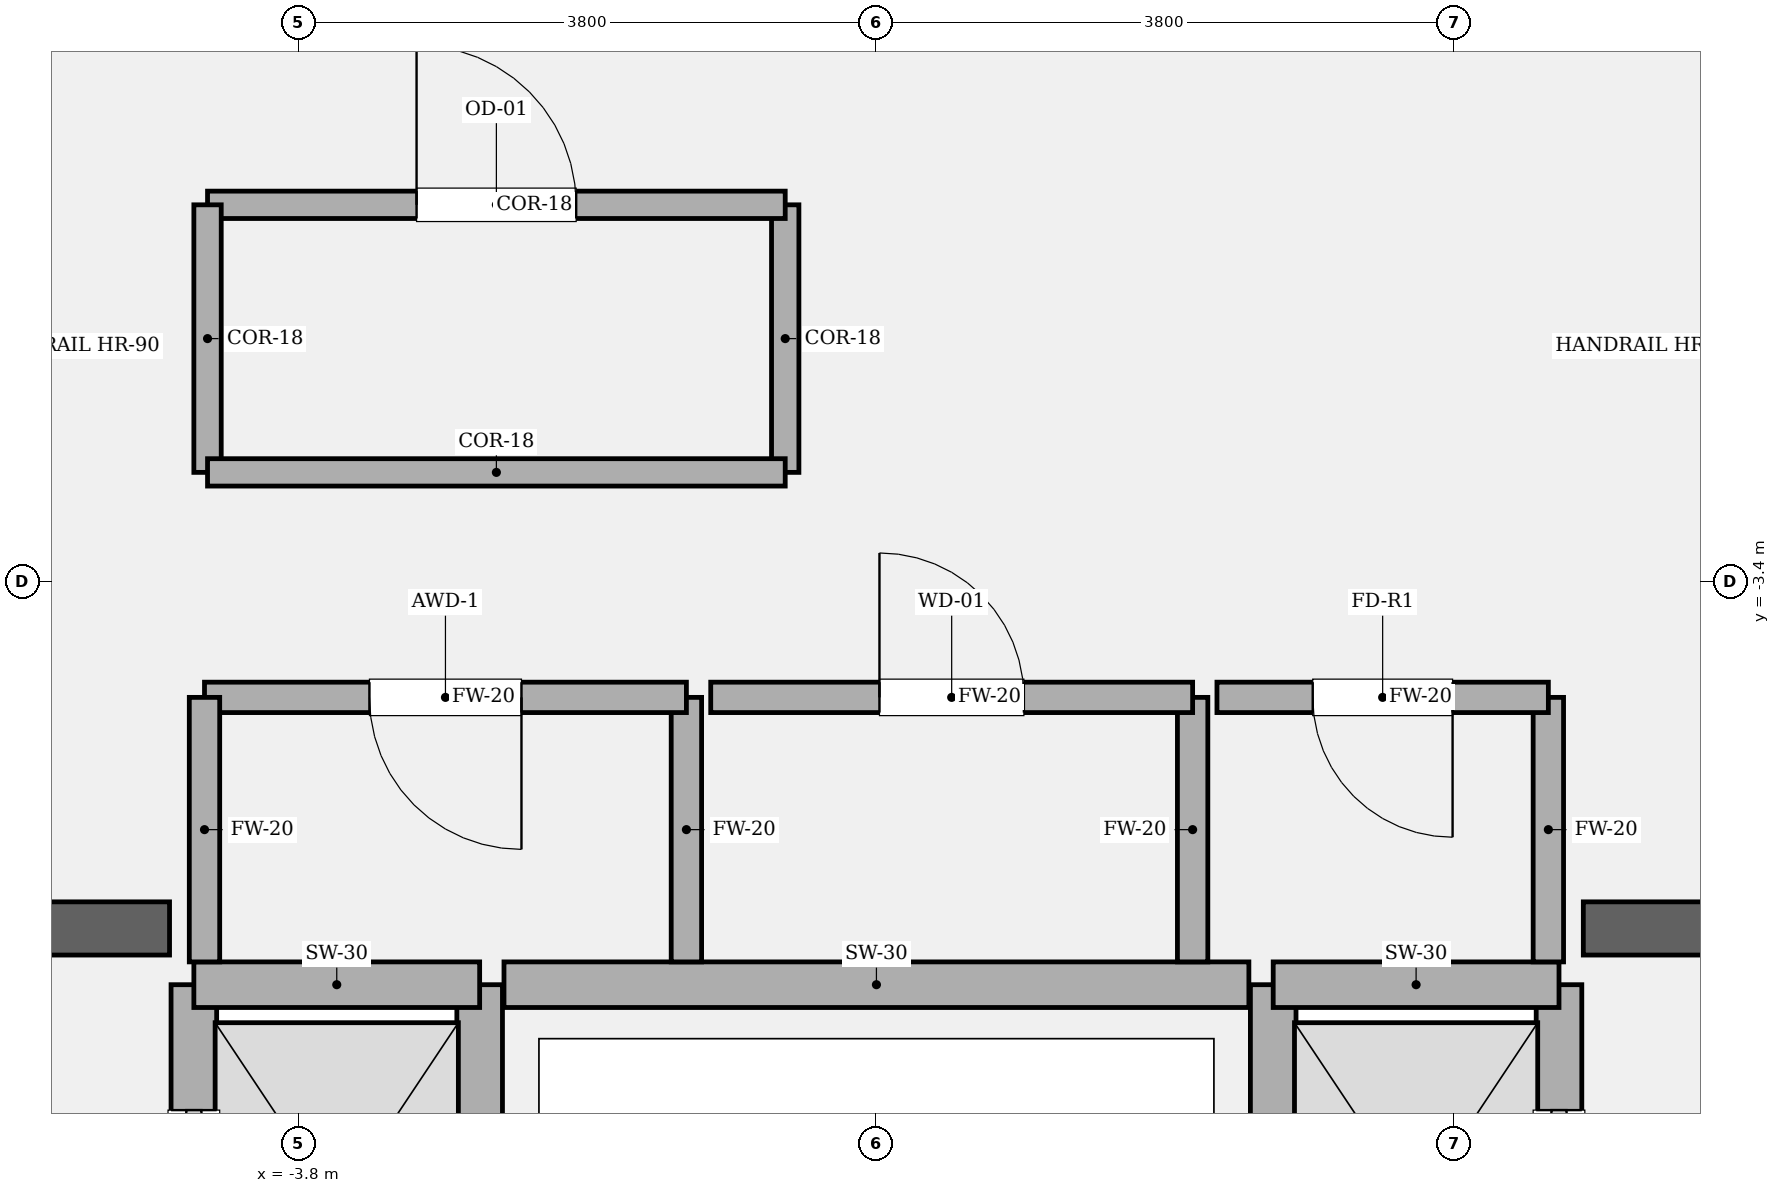
"""IFC4 building model, lengths in metres.
Left out: names, types, materials, properties, quantities, classifications, styles, units other than length and angle.
Written with IfcOpenShell. Run it as: python <this file> out.ifc"""

import sys

from ifc_helpers import new_model, si_unit, direction, frame, frame_2d, origin, place, context, subcontext, project, spatial, rectangle, extrude, element, fill, save


model = new_model("IFC4")
c1 = context("Model", 3, precision=1e-05, world=origin(), true_north=direction((0.0, 1.0)))
c2 = subcontext(c1, "Body", "Model", "MODEL_VIEW")
j1 = project(units=[si_unit("LENGTHUNIT", "METRE"), si_unit("PLANEANGLEUNIT", "RADIAN")], contexts=[c1])
p1 = place(None, origin())
s1 = spatial("IfcSite", under=j1, at=p1, CompositionType="ELEMENT")
p2 = place(p1, origin())
s2 = spatial("IfcBuilding", under=s1, at=p2, CompositionType="ELEMENT")
p3 = place(p2, frame((0.0, 0.0, 200.55)))
s3 = spatial("IfcBuildingStorey", under=s2, at=p3, CompositionType="ELEMENT", Elevation=200.55)
p4 = place(p3, frame((-9.875, -5.68, 0.0), z_axis=(0.0, 0.0, 1.0), x_axis=(1.0, 0.0, 0.0)))
e1 = element("IfcWall", 1, at=p4, inside=s3, PredefinedType="SOLIDWALL", context=c2, shape_type="SweptSolid", body=[
    extrude(rectangle(XDim=5.225, YDim=0.35, at=frame_2d((2.613, 0.0))), origin(), (0.0, 0.0, 1.0), 4.05),
])
p5 = place(p4, frame((1.335, 0.0, 0.0)))
e2 = element("IfcOpeningElement", 2, at=p5, cuts=e1, PredefinedType="OPENING", context=c2, shape_type="SweptSolid", body=[
    extrude(rectangle(XDim=1.18, YDim=2.2, at=frame_2d((0.59, 1.1))), frame((0.0, 0.185, 0.0), z_axis=(0.0, -1.0, 0.0), x_axis=(1.0, 0.0, 0.0)), (0.0, 0.0, 1.0), 0.37),
])
p6 = place(p3, frame((4.65, -5.68, 0.0), z_axis=(0.0, 0.0, 1.0), x_axis=(1.0, 0.0, 0.0)))
e3 = element("IfcWall", 3, at=p6, inside=s3, PredefinedType="SOLIDWALL", context=c2, shape_type="SweptSolid", body=[
    extrude(rectangle(XDim=5.225, YDim=0.35, at=frame_2d((2.613, 0.0))), origin(), (0.0, 0.0, 1.0), 4.05),
])
p7 = place(p6, frame((2.71, 0.0, 0.0)))
e4 = element("IfcOpeningElement", 4, at=p7, cuts=e3, PredefinedType="OPENING", context=c2, shape_type="SweptSolid", body=[
    extrude(rectangle(XDim=1.18, YDim=2.2, at=frame_2d((0.59, 1.1))), frame((0.0, 0.185, 0.0), z_axis=(0.0, -1.0, 0.0), x_axis=(1.0, 0.0, 0.0)), (0.0, 0.0, 1.0), 0.37),
])
p8 = place(p3, frame((-4.49, -8.82, 0.0), z_axis=(0.0, 0.0, 1.0), x_axis=(0.0, 1.0, 0.0)))
e5 = element("IfcWall", 5, at=p8, inside=s3, PredefinedType="SOLIDWALL", context=c2, shape_type="SweptSolid", body=[
    extrude(rectangle(XDim=2.77, YDim=0.3, at=frame_2d((1.385, 0.0))), origin(), (0.0, 0.0, 1.0), 3.77),
])
p9 = place(p8, frame((0.825, 0.0, 0.0)))
e6 = element("IfcOpeningElement", 6, at=p9, cuts=e5, PredefinedType="OPENING", context=c2, shape_type="SweptSolid", body=[
    extrude(rectangle(XDim=1.12, YDim=2.25, at=frame_2d((0.56, 1.125))), frame((0.0, 0.16, 0.0), z_axis=(0.0, -1.0, 0.0), x_axis=(1.0, 0.0, 0.0)), (0.0, 0.0, 1.0), 0.32),
])
p10 = place(p3, frame((-2.61, -8.82, 0.0), z_axis=(0.0, 0.0, 1.0), x_axis=(0.0, 1.0, 0.0)))
e7 = element("IfcWall", 7, at=p10, inside=s3, PredefinedType="SOLIDWALL", context=c2, shape_type="SweptSolid", body=[
    extrude(rectangle(XDim=2.77, YDim=0.3, at=frame_2d((1.385, 0.0))), origin(), (0.0, 0.0, 1.0), 3.77),
])
p11 = place(p3, frame((-4.49, -6.05, 0.0), z_axis=(0.0, 0.0, 1.0), x_axis=(1.0, 0.0, 0.0)))
e8 = element("IfcWall", 8, at=p11, inside=s3, PredefinedType="SOLIDWALL", context=c2, shape_type="SweptSolid", body=[
    extrude(rectangle(XDim=1.88, YDim=0.3, at=frame_2d((0.94, 0.0))), origin(), (0.0, 0.0, 1.0), 3.77),
])
p12 = place(p3, frame((4.49, -8.82, 0.0), z_axis=(0.0, 0.0, 1.0), x_axis=(0.0, 1.0, 0.0)))
e9 = element("IfcWall", 9, at=p12, inside=s3, PredefinedType="SOLIDWALL", context=c2, shape_type="SweptSolid", body=[
    extrude(rectangle(XDim=2.77, YDim=0.3, at=frame_2d((1.385, 0.0))), origin(), (0.0, 0.0, 1.0), 3.77),
])
p13 = place(p12, frame((0.825, 0.0, 0.0)))
e10 = element("IfcOpeningElement", 10, at=p13, cuts=e9, PredefinedType="OPENING", context=c2, shape_type="SweptSolid", body=[
    extrude(rectangle(XDim=1.12, YDim=2.25, at=frame_2d((0.56, 1.125))), frame((0.0, 0.16, 0.0), z_axis=(0.0, -1.0, 0.0), x_axis=(1.0, 0.0, 0.0)), (0.0, 0.0, 1.0), 0.32),
])
p14 = place(p3, frame((2.61, -8.82, 0.0), z_axis=(0.0, 0.0, 1.0), x_axis=(0.0, 1.0, 0.0)))
e11 = element("IfcWall", 11, at=p14, inside=s3, PredefinedType="SOLIDWALL", context=c2, shape_type="SweptSolid", body=[
    extrude(rectangle(XDim=2.77, YDim=0.3, at=frame_2d((1.385, 0.0))), origin(), (0.0, 0.0, 1.0), 3.77),
])
p15 = place(p3, frame((2.61, -6.05, 0.0), z_axis=(0.0, 0.0, 1.0), x_axis=(1.0, 0.0, 0.0)))
e12 = element("IfcWall", 12, at=p15, inside=s3, PredefinedType="SOLIDWALL", context=c2, shape_type="SweptSolid", body=[
    extrude(rectangle(XDim=1.88, YDim=0.3, at=frame_2d((0.94, 0.0))), origin(), (0.0, 0.0, 1.0), 3.77),
])
p16 = place(p3, frame((-2.45, -6.05, 0.0), z_axis=(0.0, 0.0, 1.0), x_axis=(1.0, 0.0, 0.0)))
e13 = element("IfcWall", 13, at=p16, inside=s3, PredefinedType="SOLIDWALL", context=c2, shape_type="SweptSolid", body=[
    extrude(rectangle(XDim=4.9, YDim=0.3, at=frame_2d((2.45, 0.0))), origin(), (0.0, 0.0, 1.0), 3.77),
])
p17 = place(p3, frame((-1.25, -5.9, 0.0), z_axis=(0.0, 0.0, 1.0), x_axis=(0.0, 1.0, 0.0)))
e14 = element("IfcWall", 14, at=p17, inside=s3, PredefinedType="SOLIDWALL", context=c2, shape_type="SweptSolid", body=[
    extrude(rectangle(XDim=1.74, YDim=0.2, at=frame_2d((0.87, 0.0))), origin(), (0.0, 0.0, 1.0), 3.77),
])
p18 = place(p3, frame((-1.25, -4.16, 0.0), z_axis=(0.0, 0.0, 1.0), x_axis=(-1.0, 0.0, 0.0)))
e15 = element("IfcWall", 15, at=p18, inside=s3, PredefinedType="SOLIDWALL", context=c2, shape_type="SweptSolid", body=[
    extrude(rectangle(XDim=3.17, YDim=0.2, at=frame_2d((1.585, 0.0))), origin(), (0.0, 0.0, 1.0), 3.77),
])
p19 = place(p18, frame((1.085, 0.0, 0.0)))
e16 = element("IfcOpeningElement", 16, at=p19, cuts=e15, PredefinedType="OPENING", context=c2, shape_type="SweptSolid", body=[
    extrude(rectangle(XDim=1.0, YDim=2.15, at=frame_2d((0.5, 1.075))), frame((0.0, 0.11, 0.0), z_axis=(0.0, -1.0, 0.0), x_axis=(1.0, 0.0, 0.0)), (0.0, 0.0, 1.0), 0.22),
])
for number, where, z_axis, x_axis in (
    (17, (-4.42, -4.16, 0.0), (0.0, 0.0, 1.0), (0.0, -1.0, 0.0)),
    (18, (2.08, -5.9, 0.0), (0.0, 0.0, 1.0), (0.0, 1.0, 0.0)),
):
    element("IfcWall", number, at=place(p3, frame(where, z_axis=z_axis, x_axis=x_axis)), inside=s3, PredefinedType="SOLIDWALL", context=c2, shape_type="SweptSolid", body=[
        extrude(rectangle(XDim=1.74, YDim=0.2, at=frame_2d((0.87, 0.0))), origin(), (0.0, 0.0, 1.0), 3.77),
    ])
p20 = place(p3, frame((2.08, -4.16, 0.0), z_axis=(0.0, 0.0, 1.0), x_axis=(-1.0, 0.0, 0.0)))
e19 = element("IfcWall", 19, at=p20, inside=s3, PredefinedType="SOLIDWALL", context=c2, shape_type="SweptSolid", body=[
    extrude(rectangle(XDim=3.17, YDim=0.2, at=frame_2d((1.585, 0.0))), origin(), (0.0, 0.0, 1.0), 3.77),
])
p21 = place(p20, frame((1.11, 0.0, 0.0)))
e20 = element("IfcOpeningElement", 20, at=p21, cuts=e19, PredefinedType="OPENING", context=c2, shape_type="SweptSolid", body=[
    extrude(rectangle(XDim=0.95, YDim=2.15, at=frame_2d((0.475, 1.075))), frame((0.0, 0.11, 0.0), z_axis=(0.0, -1.0, 0.0), x_axis=(1.0, 0.0, 0.0)), (0.0, 0.0, 1.0), 0.22),
])
p22 = place(p3, frame((4.42, -5.9, 0.0), z_axis=(0.0, 0.0, 1.0), x_axis=(0.0, 1.0, 0.0)))
e21 = element("IfcWall", 21, at=p22, inside=s3, PredefinedType="SOLIDWALL", context=c2, shape_type="SweptSolid", body=[
    extrude(rectangle(XDim=1.74, YDim=0.2, at=frame_2d((0.87, 0.0))), origin(), (0.0, 0.0, 1.0), 3.77),
])
p23 = place(p3, frame((4.42, -4.16, 0.0), z_axis=(0.0, 0.0, 1.0), x_axis=(-1.0, 0.0, 0.0)))
e22 = element("IfcWall", 22, at=p23, inside=s3, PredefinedType="SOLIDWALL", context=c2, shape_type="SweptSolid", body=[
    extrude(rectangle(XDim=2.18, YDim=0.2, at=frame_2d((1.09, 0.0))), origin(), (0.0, 0.0, 1.0), 3.77),
])
p24 = place(p23, frame((0.63, 0.0, 0.0)))
e23 = element("IfcOpeningElement", 23, at=p24, cuts=e22, PredefinedType="OPENING", context=c2, shape_type="SweptSolid", body=[
    extrude(rectangle(XDim=0.92, YDim=2.1, at=frame_2d((0.46, 1.05))), frame((0.0, 0.11, 0.0), z_axis=(0.0, -1.0, 0.0), x_axis=(1.0, 0.0, 0.0)), (0.0, 0.0, 1.0), 0.22),
])
p25 = place(p3, frame((-0.6, -2.68, 0.0), z_axis=(0.0, 0.0, 1.0), x_axis=(0.0, 1.0, 0.0)))
e24 = element("IfcWall", 24, at=p25, inside=s3, PredefinedType="PARTITIONING", context=c2, shape_type="SweptSolid", body=[
    extrude(rectangle(XDim=1.76, YDim=0.18, at=frame_2d((0.88, 0.0))), origin(), (0.0, 0.0, 1.0), 3.77),
])
p26 = place(p3, frame((-0.6, -0.92, 0.0), z_axis=(0.0, 0.0, 1.0), x_axis=(-1.0, 0.0, 0.0)))
e25 = element("IfcWall", 25, at=p26, inside=s3, PredefinedType="PARTITIONING", context=c2, shape_type="SweptSolid", body=[
    extrude(rectangle(XDim=3.8, YDim=0.18, at=frame_2d((1.9, 0.0))), origin(), (0.0, 0.0, 1.0), 3.77),
])
p27 = place(p26, frame((1.375, 0.0, 0.0)))
e26 = element("IfcOpeningElement", 26, at=p27, cuts=e25, PredefinedType="OPENING", context=c2, shape_type="SweptSolid", body=[
    extrude(rectangle(XDim=1.05, YDim=2.2, at=frame_2d((0.525, 1.1))), frame((0.0, 0.1, 0.0), z_axis=(0.0, -1.0, 0.0), x_axis=(1.0, 0.0, 0.0)), (0.0, 0.0, 1.0), 0.2),
])
p28 = place(p3, frame((-4.4, -0.92, 0.0), z_axis=(0.0, 0.0, 1.0), x_axis=(0.0, -1.0, 0.0)))
e27 = element("IfcWall", 27, at=p28, inside=s3, PredefinedType="PARTITIONING", context=c2, shape_type="SweptSolid", body=[
    extrude(rectangle(XDim=1.76, YDim=0.18, at=frame_2d((0.88, 0.0))), origin(), (0.0, 0.0, 1.0), 3.77),
])
p29 = place(p3, frame((-4.4, -2.68, 0.0), z_axis=(0.0, 0.0, 1.0), x_axis=(1.0, 0.0, 0.0)))
e28 = element("IfcWall", 28, at=p29, inside=s3, PredefinedType="PARTITIONING", context=c2, shape_type="SweptSolid", body=[
    extrude(rectangle(XDim=3.8, YDim=0.18, at=frame_2d((1.9, 0.0))), origin(), (0.0, 0.0, 1.0), 3.77),
])
p30 = place(p9, origin())
e29 = element("IfcDoor", 29, at=p30, inside=s3, OperationType="SLIDING_TO_LEFT", PredefinedType="DOOR", context=c2, shape_type="SweptSolid", body=[
    extrude(rectangle(XDim=1.12, YDim=2.25, at=frame_2d((0.56, 1.125))), frame((0.0, 0.025, 0.0), z_axis=(0.0, -1.0, 0.0), x_axis=(1.0, 0.0, 0.0)), (0.0, 0.0, 1.0), 0.05),
])
fill(e6, e29)
p31 = place(p13, origin())
e30 = element("IfcDoor", 30, at=p31, inside=s3, OperationType="SLIDING_TO_RIGHT", PredefinedType="DOOR", context=c2, shape_type="SweptSolid", body=[
    extrude(rectangle(XDim=1.12, YDim=2.25, at=frame_2d((0.56, 1.125))), frame((0.0, 0.025, 0.0), z_axis=(0.0, -1.0, 0.0), x_axis=(1.0, 0.0, 0.0)), (0.0, 0.0, 1.0), 0.05),
])
fill(e10, e30)
p32 = place(p19, origin())
e31 = element("IfcDoor", 31, at=p32, inside=s3, OperationType="SINGLE_SWING_LEFT", PredefinedType="DOOR", context=c2, shape_type="SweptSolid", body=[
    extrude(rectangle(XDim=1.0, YDim=2.15, at=frame_2d((0.5, 1.075))), frame((0.0, 0.025, 0.0), z_axis=(0.0, -1.0, 0.0), x_axis=(1.0, 0.0, 0.0)), (0.0, 0.0, 1.0), 0.05),
])
fill(e16, e31)
p33 = place(p21, origin())
e32 = element("IfcDoor", 32, at=p33, inside=s3, OperationType="SINGLE_SWING_RIGHT", PredefinedType="DOOR", context=c2, shape_type="SweptSolid", body=[
    extrude(rectangle(XDim=0.95, YDim=2.15, at=frame_2d((0.475, 1.075))), frame((0.0, 0.025, 0.0), z_axis=(0.0, -1.0, 0.0), x_axis=(1.0, 0.0, 0.0)), (0.0, 0.0, 1.0), 0.05),
])
fill(e20, e32)
p34 = place(p24, origin())
e33 = element("IfcDoor", 33, at=p34, inside=s3, OperationType="SINGLE_SWING_LEFT", PredefinedType="DOOR", context=c2, shape_type="SweptSolid", body=[
    extrude(rectangle(XDim=0.92, YDim=2.1, at=frame_2d((0.46, 1.05))), frame((0.0, 0.025, 0.0), z_axis=(0.0, -1.0, 0.0), x_axis=(1.0, 0.0, 0.0)), (0.0, 0.0, 1.0), 0.05),
])
fill(e23, e33)
p35 = place(p27, origin())
e34 = element("IfcDoor", 34, at=p35, inside=s3, OperationType="SINGLE_SWING_RIGHT", PredefinedType="DOOR", context=c2, shape_type="SweptSolid", body=[
    extrude(rectangle(XDim=1.05, YDim=2.2, at=frame_2d((0.525, 1.1))), frame((0.0, 0.025, 0.0), z_axis=(0.0, -1.0, 0.0), x_axis=(1.0, 0.0, 0.0)), (0.0, 0.0, 1.0), 0.05),
])
fill(e26, e34)
save(model, sys.argv[1])
